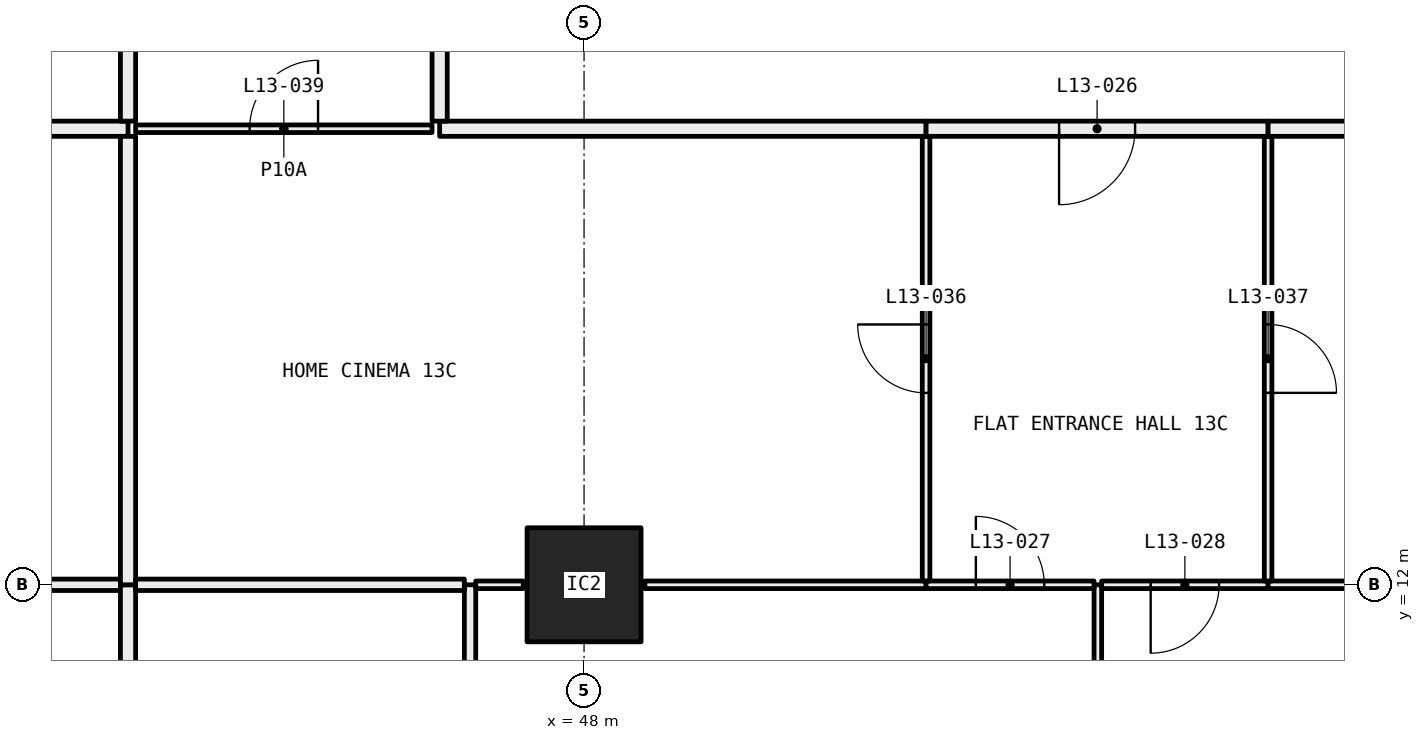
"""IFC4 building model, lengths in metres.
Left out: names, types, materials, properties, quantities, classifications, styles, units other than length and angle.
Written with IfcOpenShell. Run it as: python <this file> out.ifc"""

import sys

from ifc_helpers import new_model, si_unit, direction, frame, frame_2d, origin, origin_2d, place, context, subcontext, project, spatial, rectangle, hollow_rectangle, extrude, element, fill, save


model = new_model("IFC4")
c1 = context("Model", 3, precision=1e-05, world=origin(), true_north=direction((0.0, 1.0)))
c2 = subcontext(c1, "Body", "Model", "MODEL_VIEW")
j1 = project(units=[si_unit("LENGTHUNIT", "METRE"), si_unit("PLANEANGLEUNIT", "RADIAN")], contexts=[c1])
p1 = place(None, origin())
s1 = spatial("IfcSite", under=j1, at=p1, CompositionType="ELEMENT")
p2 = place(p1, origin())
s2 = spatial("IfcBuilding", under=s1, at=p2, CompositionType="ELEMENT")
p3 = place(p2, frame((0.0, 0.0, 57.6)))
s3 = spatial("IfcBuildingStorey", under=s2, at=p3, CompositionType="ELEMENT", Elevation=57.6)
p4 = place(p3, frame((48.0, 12.0, 0.0), z_axis=(0.0, 0.0, 1.0), x_axis=(1.0, 0.0, 0.0)))
e1 = element("IfcColumn", 1, at=p4, inside=s3, PredefinedType="COLUMN", context=c2, shape_type="SweptSolid", body=[
    extrude(hollow_rectangle(XDim=1.5, YDim=1.5, WallThickness=0.065, at=origin_2d()), origin(), (0.0, 0.0, 1.0), 3.05),
])
p5 = place(p3, frame((41.9, 12.0, 0.0), z_axis=(0.0, 0.0, 1.0), x_axis=(-1.0, 0.0, 0.0)))
e2 = element("IfcWall", 2, at=p5, inside=s3, PredefinedType="PARTITIONING", context=c2, shape_type="SweptSolid", body=[
    extrude(rectangle(XDim=4.325, YDim=0.15, at=frame_2d((2.163, 0.0))), origin(), (0.0, 0.0, 1.0), 2.45),
])
p6 = place(p3, frame((42.0, 9.0, 0.0), z_axis=(0.0, 0.0, 1.0), x_axis=(0.0, 1.0, 0.0)))
e3 = element("IfcWall", 3, at=p6, inside=s3, PredefinedType="PARTITIONING", context=c2, shape_type="SweptSolid", body=[
    extrude(rectangle(XDim=3.0, YDim=0.2, at=frame_2d((1.5, 0.0))), origin(), (0.0, 0.0, 1.0), 2.45),
])
p7 = place(p3, frame((42.0, 18.0, 0.0), z_axis=(0.0, 0.0, 1.0), x_axis=(-1.0, 0.0, 0.0)))
e4 = element("IfcWall", 4, at=p7, inside=s3, PredefinedType="PARTITIONING", context=c2, shape_type="SweptSolid", body=[
    extrude(rectangle(XDim=6.0, YDim=0.2, at=frame_2d((3.0, 0.0))), origin(), (0.0, 0.0, 1.0), 2.45),
])
p8 = place(p3, frame((42.0, 12.0, 0.0), z_axis=(0.0, 0.0, 1.0), x_axis=(0.0, 1.0, 0.0)))
e5 = element("IfcWall", 5, at=p8, inside=s3, PredefinedType="PARTITIONING", context=c2, shape_type="SweptSolid", body=[
    extrude(rectangle(XDim=5.9, YDim=0.2, at=frame_2d((2.95, 0.0))), origin(), (0.0, 0.0, 1.0), 2.45),
])
p9 = place(p3, frame((42.0, 18.1, 0.0), z_axis=(0.0, 0.0, 1.0), x_axis=(0.0, 1.0, 0.0)))
e6 = element("IfcWall", 6, at=p9, inside=s3, PredefinedType="PARTITIONING", context=c2, shape_type="SweptSolid", body=[
    extrude(rectangle(XDim=6.2, YDim=0.2, at=frame_2d((3.1, 0.0))), origin(), (0.0, 0.0, 1.0), 2.45),
])
p10 = place(p3, frame((46.5, 9.075, 0.0), z_axis=(0.0, 0.0, 1.0), x_axis=(0.0, 1.0, 0.0)))
e7 = element("IfcWall", 7, at=p10, inside=s3, PredefinedType="PARTITIONING", context=c2, shape_type="SweptSolid", body=[
    extrude(rectangle(XDim=2.925, YDim=0.15, at=frame_2d((1.462, 0.0))), origin(), (0.0, 0.0, 1.0), 2.45),
])
p11 = place(p10, frame((1.012, 0.0, 0.0)))
e8 = element("IfcOpeningElement", 8, at=p11, cuts=e7, PredefinedType="OPENING", context=c2, shape_type="SweptSolid", body=[
    extrude(rectangle(XDim=0.9, YDim=2.1, at=frame_2d((0.45, 1.05))), frame((0.0, 0.085, 0.0), z_axis=(0.0, -1.0, 0.0), x_axis=(1.0, 0.0, 0.0)), (0.0, 0.0, 1.0), 0.17),
])
p12 = place(p3, frame((46.425, 12.0, 0.0), z_axis=(0.0, 0.0, 1.0), x_axis=(-1.0, 0.0, 0.0)))
e9 = element("IfcWall", 9, at=p12, inside=s3, PredefinedType="PARTITIONING", context=c2, shape_type="SweptSolid", body=[
    extrude(rectangle(XDim=4.325, YDim=0.15, at=frame_2d((2.163, 0.0))), origin(), (0.0, 0.0, 1.0), 2.45),
])
p13 = place(p3, frame((54.76, 6.05, 0.0), z_axis=(0.0, 0.0, 1.0), x_axis=(0.0, 1.0, 0.0)))
e10 = element("IfcWall", 10, at=p13, inside=s3, PredefinedType="PARTITIONING", context=c2, shape_type="SweptSolid", body=[
    extrude(rectangle(XDim=5.95, YDim=0.1, at=frame_2d((2.975, 0.0))), origin(), (0.0, 0.0, 1.0), 2.45),
])
p14 = place(p3, frame((47.2, 12.0, 0.0), z_axis=(0.0, 0.0, 1.0), x_axis=(-1.0, 0.0, 0.0)))
e11 = element("IfcWall", 11, at=p14, inside=s3, PredefinedType="PARTITIONING", context=c2, shape_type="SweptSolid", body=[
    extrude(rectangle(XDim=0.625, YDim=0.1, at=frame_2d((0.312, 0.0))), origin(), (0.0, 0.0, 1.0), 2.45),
])
p15 = place(p3, frame((52.5, 12.0, 0.0), z_axis=(0.0, 0.0, 1.0), x_axis=(-1.0, 0.0, 0.0)))
e12 = element("IfcWall", 12, at=p15, inside=s3, PredefinedType="PARTITIONING", context=c2, shape_type="SweptSolid", body=[
    extrude(rectangle(XDim=3.7, YDim=0.1, at=frame_2d((1.85, 0.0))), origin(), (0.0, 0.0, 1.0), 2.45),
])
p16 = place(p3, frame((54.71, 12.0, 0.0), z_axis=(0.0, 0.0, 1.0), x_axis=(-1.0, 0.0, 0.0)))
e13 = element("IfcWall", 13, at=p16, inside=s3, PredefinedType="PARTITIONING", context=c2, shape_type="SweptSolid", body=[
    extrude(rectangle(XDim=2.21, YDim=0.1, at=frame_2d((1.105, 0.0))), origin(), (0.0, 0.0, 1.0), 2.45),
])
p17 = place(p16, frame((0.655, 0.0, 0.0)))
e14 = element("IfcOpeningElement", 14, at=p17, cuts=e13, PredefinedType="OPENING", context=c2, shape_type="SweptSolid", body=[
    extrude(rectangle(XDim=0.9, YDim=2.1, at=frame_2d((0.45, 1.05))), frame((0.0, 0.06, 0.0), z_axis=(0.0, -1.0, 0.0), x_axis=(1.0, 0.0, 0.0)), (0.0, 0.0, 1.0), 0.12),
])
p18 = place(p3, frame((57.0, 12.0, 0.0), z_axis=(0.0, 0.0, 1.0), x_axis=(-1.0, 0.0, 0.0)))
e15 = element("IfcWall", 15, at=p18, inside=s3, PredefinedType="PARTITIONING", context=c2, shape_type="SweptSolid", body=[
    extrude(rectangle(XDim=2.19, YDim=0.1, at=frame_2d((1.095, 0.0))), origin(), (0.0, 0.0, 1.0), 2.45),
])
p19 = place(p18, frame((0.645, 0.0, 0.0)))
e16 = element("IfcOpeningElement", 16, at=p19, cuts=e15, PredefinedType="OPENING", context=c2, shape_type="SweptSolid", body=[
    extrude(rectangle(XDim=0.9, YDim=2.1, at=frame_2d((0.45, 1.05))), frame((0.0, 0.06, 0.0), z_axis=(0.0, -1.0, 0.0), x_axis=(1.0, 0.0, 0.0)), (0.0, 0.0, 1.0), 0.12),
])
p20 = place(p3, frame((59.2, 12.0, 0.0), z_axis=(0.0, 0.0, 1.0), x_axis=(-1.0, 0.0, 0.0)))
e17 = element("IfcWall", 17, at=p20, inside=s3, PredefinedType="PARTITIONING", context=c2, shape_type="SweptSolid", body=[
    extrude(rectangle(XDim=2.2, YDim=0.1, at=frame_2d((1.1, 0.0))), origin(), (0.0, 0.0, 1.0), 2.45),
])
p21 = place(p3, frame((52.5, 12.05, 0.0), z_axis=(0.0, 0.0, 1.0), x_axis=(0.0, 1.0, 0.0)))
e18 = element("IfcWall", 18, at=p21, inside=s3, PredefinedType="PARTITIONING", context=c2, shape_type="SweptSolid", body=[
    extrude(rectangle(XDim=5.85, YDim=0.1, at=frame_2d((2.925, 0.0))), origin(), (0.0, 0.0, 1.0), 2.45),
])
p22 = place(p21, frame((2.475, 0.0, 0.0)))
e19 = element("IfcOpeningElement", 19, at=p22, cuts=e18, PredefinedType="OPENING", context=c2, shape_type="SweptSolid", body=[
    extrude(rectangle(XDim=0.9, YDim=2.1, at=frame_2d((0.45, 1.05))), frame((0.0, 0.06, 0.0), z_axis=(0.0, -1.0, 0.0), x_axis=(1.0, 0.0, 0.0)), (0.0, 0.0, 1.0), 0.12),
])
p23 = place(p3, frame((46.0, 18.0, 0.0), z_axis=(0.0, 0.0, 1.0), x_axis=(-1.0, 0.0, 0.0)))
e20 = element("IfcWall", 20, at=p23, inside=s3, PredefinedType="PARTITIONING", context=c2, shape_type="SweptSolid", body=[
    extrude(rectangle(XDim=3.9, YDim=0.1, at=frame_2d((1.95, 0.0))), origin(), (0.0, 0.0, 1.0), 3.05),
])
p24 = place(p23, frame((1.5, 0.0, 0.0)))
e21 = element("IfcOpeningElement", 21, at=p24, cuts=e20, PredefinedType="OPENING", context=c2, shape_type="SweptSolid", body=[
    extrude(rectangle(XDim=0.9, YDim=2.1, at=frame_2d((0.45, 1.05))), frame((0.0, 0.06, 0.0), z_axis=(0.0, -1.0, 0.0), x_axis=(1.0, 0.0, 0.0)), (0.0, 0.0, 1.0), 0.12),
])
p25 = place(p3, frame((52.5, 18.0, 0.0), z_axis=(0.0, 0.0, 1.0), x_axis=(-1.0, 0.0, 0.0)))
e22 = element("IfcWall", 22, at=p25, inside=s3, PredefinedType="PARTITIONING", context=c2, shape_type="SweptSolid", body=[
    extrude(rectangle(XDim=6.4, YDim=0.2, at=frame_2d((3.2, 0.0))), origin(), (0.0, 0.0, 1.0), 3.05),
])
p26 = place(p3, frame((57.0, 12.05, 0.0), z_axis=(0.0, 0.0, 1.0), x_axis=(0.0, 1.0, 0.0)))
e23 = element("IfcWall", 23, at=p26, inside=s3, PredefinedType="PARTITIONING", context=c2, shape_type="SweptSolid", body=[
    extrude(rectangle(XDim=5.85, YDim=0.1, at=frame_2d((2.925, 0.0))), origin(), (0.0, 0.0, 1.0), 2.45),
])
p27 = place(p26, frame((2.475, 0.0, 0.0)))
e24 = element("IfcOpeningElement", 24, at=p27, cuts=e23, PredefinedType="OPENING", context=c2, shape_type="SweptSolid", body=[
    extrude(rectangle(XDim=0.9, YDim=2.1, at=frame_2d((0.45, 1.05))), frame((0.0, 0.06, 0.0), z_axis=(0.0, -1.0, 0.0), x_axis=(1.0, 0.0, 0.0)), (0.0, 0.0, 1.0), 0.12),
])
p28 = place(p3, frame((57.0, 18.0, 0.0), z_axis=(0.0, 0.0, 1.0), x_axis=(-1.0, 0.0, 0.0)))
e25 = element("IfcWall", 25, at=p28, inside=s3, PredefinedType="PARTITIONING", context=c2, shape_type="SweptSolid", body=[
    extrude(rectangle(XDim=4.5, YDim=0.2, at=frame_2d((2.25, 0.0))), origin(), (0.0, 0.0, 1.0), 3.05),
])
p29 = place(p28, frame((1.75, 0.0, 0.0)))
e26 = element("IfcOpeningElement", 26, at=p29, cuts=e25, PredefinedType="OPENING", context=c2, shape_type="SweptSolid", body=[
    extrude(rectangle(XDim=1.0, YDim=2.1, at=frame_2d((0.5, 1.05))), frame((0.0, 0.11, 0.0), z_axis=(0.0, -1.0, 0.0), x_axis=(1.0, 0.0, 0.0)), (0.0, 0.0, 1.0), 0.22),
])
p30 = place(p3, frame((61.9, 18.0, 0.0), z_axis=(0.0, 0.0, 1.0), x_axis=(-1.0, 0.0, 0.0)))
e27 = element("IfcWall", 27, at=p30, inside=s3, PredefinedType="PARTITIONING", context=c2, shape_type="SweptSolid", body=[
    extrude(rectangle(XDim=4.9, YDim=0.2, at=frame_2d((2.45, 0.0))), origin(), (0.0, 0.0, 1.0), 3.05),
])
p31 = place(p3, frame((46.1, 18.1, 0.0), z_axis=(0.0, 0.0, 1.0), x_axis=(0.0, 1.0, 0.0)))
e28 = element("IfcWall", 28, at=p31, inside=s3, PredefinedType="PARTITIONING", context=c2, shape_type="SweptSolid", body=[
    extrude(rectangle(XDim=6.2, YDim=0.2, at=frame_2d((3.1, 0.0))), origin(), (0.0, 0.0, 1.0), 2.45),
])
p32 = place(p29, origin())
e29 = element("IfcDoor", 29, at=p32, inside=s3, OperationType="SINGLE_SWING_LEFT", PredefinedType="DOOR", context=c2, shape_type="SweptSolid", body=[
    extrude(rectangle(XDim=1.0, YDim=2.1, at=frame_2d((0.5, 1.05))), frame((0.0, 0.025, 0.0), z_axis=(0.0, -1.0, 0.0), x_axis=(1.0, 0.0, 0.0)), (0.0, 0.0, 1.0), 0.05),
])
fill(e26, e29)
p33 = place(p17, frame((0.9, 0.0, 0.0), x_axis=(-1.0, 0.0, 0.0)))
e30 = element("IfcDoor", 30, at=p33, inside=s3, OperationType="SINGLE_SWING_RIGHT", PredefinedType="DOOR", context=c2, shape_type="SweptSolid", body=[
    extrude(rectangle(XDim=0.9, YDim=2.1, at=frame_2d((0.45, 1.05))), frame((0.0, 0.025, 0.0), z_axis=(0.0, -1.0, 0.0), x_axis=(1.0, 0.0, 0.0)), (0.0, 0.0, 1.0), 0.05),
])
fill(e14, e30)
p34 = place(p19, origin())
e31 = element("IfcDoor", 31, at=p34, inside=s3, OperationType="SINGLE_SWING_LEFT", PredefinedType="DOOR", context=c2, shape_type="SweptSolid", body=[
    extrude(rectangle(XDim=0.9, YDim=2.1, at=frame_2d((0.45, 1.05))), frame((0.0, 0.025, 0.0), z_axis=(0.0, -1.0, 0.0), x_axis=(1.0, 0.0, 0.0)), (0.0, 0.0, 1.0), 0.05),
])
fill(e16, e31)
p35 = place(p22, origin())
e32 = element("IfcDoor", 32, at=p35, inside=s3, OperationType="SINGLE_SWING_LEFT", PredefinedType="DOOR", context=c2, shape_type="SweptSolid", body=[
    extrude(rectangle(XDim=0.9, YDim=2.1, at=frame_2d((0.45, 1.05))), frame((0.0, 0.025, 0.0), z_axis=(0.0, -1.0, 0.0), x_axis=(1.0, 0.0, 0.0)), (0.0, 0.0, 1.0), 0.05),
])
fill(e19, e32)
p36 = place(p27, frame((0.9, 0.0, 0.0), x_axis=(-1.0, 0.0, 0.0)))
e33 = element("IfcDoor", 33, at=p36, inside=s3, OperationType="SINGLE_SWING_LEFT", PredefinedType="DOOR", context=c2, shape_type="SweptSolid", body=[
    extrude(rectangle(XDim=0.9, YDim=2.1, at=frame_2d((0.45, 1.05))), frame((0.0, 0.025, 0.0), z_axis=(0.0, -1.0, 0.0), x_axis=(1.0, 0.0, 0.0)), (0.0, 0.0, 1.0), 0.05),
])
fill(e24, e33)
p37 = place(p24, frame((0.9, 0.0, 0.0), x_axis=(-1.0, 0.0, 0.0)))
e34 = element("IfcDoor", 34, at=p37, inside=s3, OperationType="SINGLE_SWING_LEFT", PredefinedType="DOOR", context=c2, shape_type="SweptSolid", body=[
    extrude(rectangle(XDim=0.9, YDim=2.1, at=frame_2d((0.45, 1.05))), frame((0.0, 0.025, 0.0), z_axis=(0.0, -1.0, 0.0), x_axis=(1.0, 0.0, 0.0)), (0.0, 0.0, 1.0), 0.05),
])
fill(e21, e34)
save(model, sys.argv[1])
